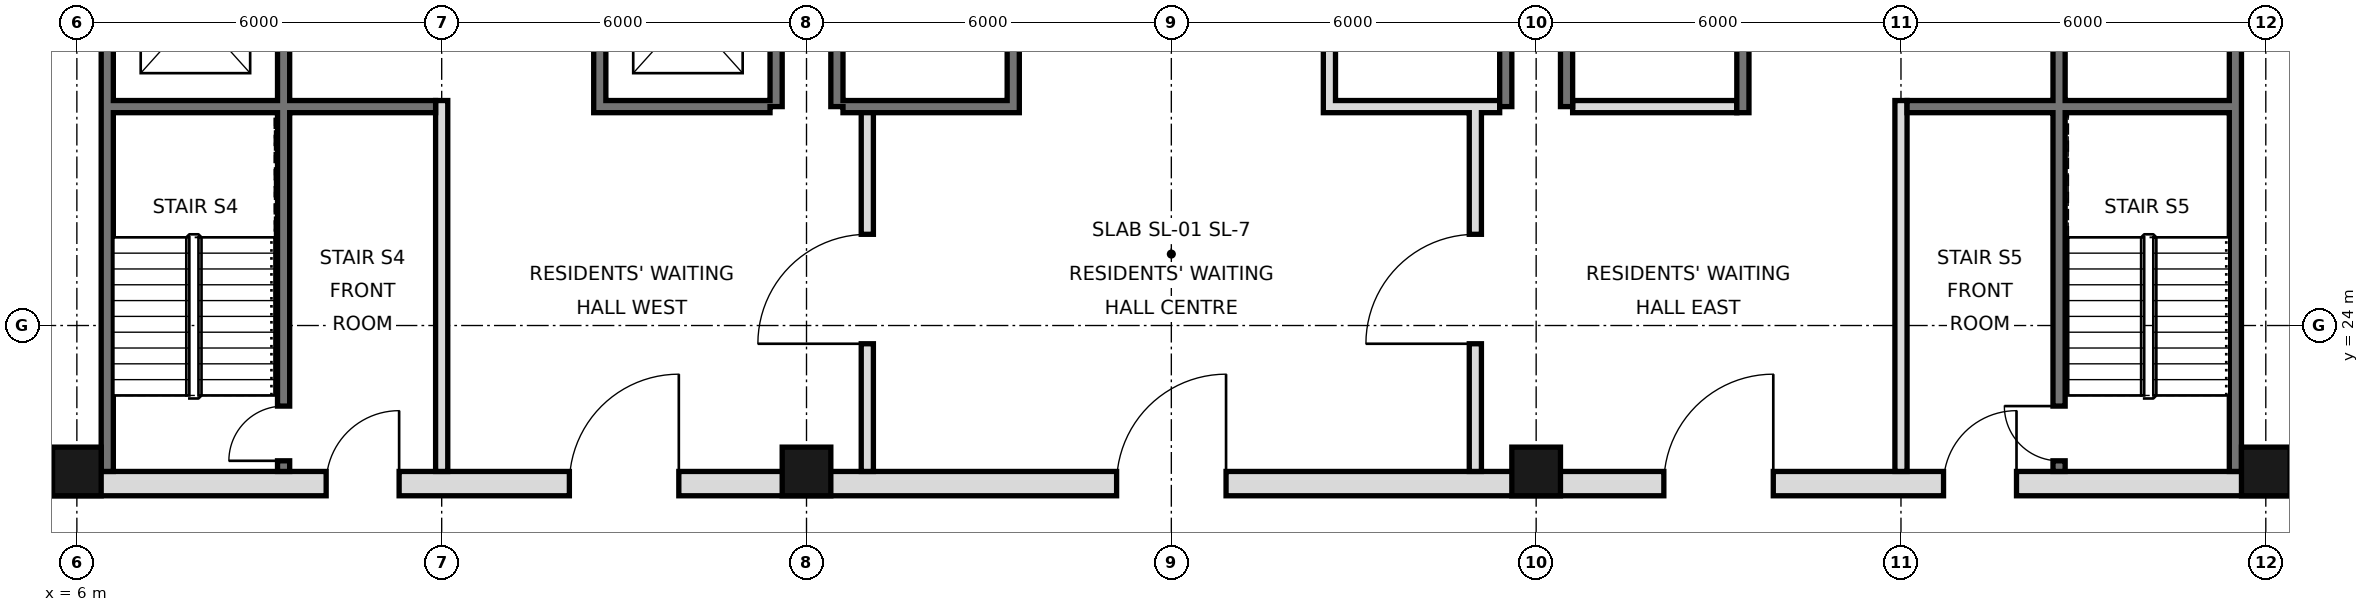
"""IFC4 building model, lengths in metres.
Left out: names, types, materials, properties, quantities, classifications, styles, units other than length and angle.
Written with IfcOpenShell. Run it as: python <this file> out.ifc"""

import sys

from ifc_helpers import new_model, si_unit, direction, frame, frame_2d, origin, origin_2d, place, context, subcontext, project, spatial, rectangle, hollow_rectangle, extrude, element, fill, save


model = new_model("IFC4")
c1 = context("Model", 3, precision=1e-05, world=origin(), true_north=direction((0.0, 1.0)))
c2 = subcontext(c1, "Body", "Model", "MODEL_VIEW")
j1 = project(units=[si_unit("LENGTHUNIT", "METRE"), si_unit("PLANEANGLEUNIT", "RADIAN")], contexts=[c1])
p1 = place(None, origin())
s1 = spatial("IfcSite", under=j1, at=p1, CompositionType="ELEMENT")
p2 = place(p1, origin())
s2 = spatial("IfcBuilding", under=s1, at=p2, CompositionType="ELEMENT")
p3 = place(p2, frame((0.0, 0.0, 123.2)))
s3 = spatial("IfcBuildingStorey", under=s2, at=p3, CompositionType="ELEMENT", Elevation=123.2)
for number, where, z_axis, x_axis in (
    (1, (6.0, 21.6, 0.0), (0.0, 0.0, 1.0), (1.0, 0.0, 0.0)),
    (2, (18.0, 21.6, 0.0), (0.0, 0.0, 1.0), (1.0, 0.0, 0.0)),
    (3, (30.0, 21.6, 0.0), (0.0, 0.0, 1.0), (1.0, 0.0, 0.0)),
    (4, (42.0, 21.6, 0.0), (0.0, 0.0, 1.0), (1.0, 0.0, 0.0)),
):
    element("IfcColumn", number, at=place(p3, frame(where, z_axis=z_axis, x_axis=x_axis)), inside=s3, PredefinedType="COLUMN", context=c2, shape_type="SweptSolid", body=[
        extrude(hollow_rectangle(XDim=0.8, YDim=0.8, WallThickness=0.05, at=origin_2d()), origin(), (0.0, 0.0, 1.0), 3.6),
    ])
for number, where, z_axis, x_axis in (
    (5, (6.5, 21.6, 0.0), (0.0, 0.0, 1.0), (0.0, 1.0, 0.0)),
    (6, (41.5, 21.6, 0.0), (0.0, 0.0, 1.0), (0.0, 1.0, 0.0)),
):
    element("IfcWall", number, at=place(p3, frame(where, z_axis=z_axis, x_axis=x_axis)), inside=s3, PredefinedType="SOLIDWALL", context=c2, shape_type="SweptSolid", body=[
        extrude(rectangle(XDim=23.5, YDim=0.2, at=frame_2d((11.75, 0.0))), origin(), (0.0, 0.0, 1.0), 3.42),
    ])
for number, where, z_axis, x_axis in (
    (7, (17.5, 27.6, 0.0), (0.0, 0.0, 1.0), (0.0, 1.0, 0.0)),
    (8, (18.5, 27.6, 0.0), (0.0, 0.0, 1.0), (0.0, 1.0, 0.0)),
    (9, (29.5, 27.6, 0.0), (0.0, 0.0, 1.0), (0.0, 1.0, 0.0)),
    (10, (30.5, 27.6, 0.0), (0.0, 0.0, 1.0), (0.0, 1.0, 0.0)),
):
    element("IfcWall", number, at=place(p3, frame(where, z_axis=z_axis, x_axis=x_axis)), inside=s3, PredefinedType="SOLIDWALL", context=c2, shape_type="SweptSolid", body=[
        extrude(rectangle(XDim=17.5, YDim=0.2, at=frame_2d((8.75, 0.0))), origin(), (0.0, 0.0, 1.0), 3.42),
    ])
p4 = place(p3, frame((5.6, 21.4, 0.0), z_axis=(0.0, 0.0, 1.0), x_axis=(1.0, 0.0, 0.0)))
e11 = element("IfcWall", 11, at=p4, inside=s3, PredefinedType="SOLIDWALL", context=c2, shape_type="SweptSolid", body=[
    extrude(rectangle(XDim=36.8, YDim=0.4, at=frame_2d((18.4, 0.0))), origin(), (0.0, 0.0, 1.0), 3.42),
])
p5 = place(p4, frame((8.5, 0.0, 0.0)))
e12 = element("IfcOpeningElement", 12, at=p5, cuts=e11, PredefinedType="OPENING", context=c2, shape_type="SweptSolid", body=[
    extrude(rectangle(XDim=1.8, YDim=2.1, at=frame_2d((0.9, 1.05))), frame((0.0, 0.21, 0.0), z_axis=(0.0, -1.0, 0.0), x_axis=(1.0, 0.0, 0.0)), (0.0, 0.0, 1.0), 0.42),
])
p6 = place(p4, frame((17.5, 0.0, 0.0)))
e13 = element("IfcOpeningElement", 13, at=p6, cuts=e11, PredefinedType="OPENING", context=c2, shape_type="SweptSolid", body=[
    extrude(rectangle(XDim=1.8, YDim=2.1, at=frame_2d((0.9, 1.05))), frame((0.0, 0.21, 0.0), z_axis=(0.0, -1.0, 0.0), x_axis=(1.0, 0.0, 0.0)), (0.0, 0.0, 1.0), 0.42),
])
p7 = place(p4, frame((26.5, 0.0, 0.0)))
e14 = element("IfcOpeningElement", 14, at=p7, cuts=e11, PredefinedType="OPENING", context=c2, shape_type="SweptSolid", body=[
    extrude(rectangle(XDim=1.8, YDim=2.1, at=frame_2d((0.9, 1.05))), frame((0.0, 0.21, 0.0), z_axis=(0.0, -1.0, 0.0), x_axis=(1.0, 0.0, 0.0)), (0.0, 0.0, 1.0), 0.42),
])
p8 = place(p4, frame((4.5, 0.0, 0.0)))
e15 = element("IfcOpeningElement", 15, at=p8, cuts=e11, PredefinedType="OPENING", context=c2, shape_type="SweptSolid", body=[
    extrude(rectangle(XDim=1.2, YDim=2.1, at=frame_2d((0.6, 1.05))), frame((0.0, 0.21, 0.0), z_axis=(0.0, -1.0, 0.0), x_axis=(1.0, 0.0, 0.0)), (0.0, 0.0, 1.0), 0.42),
])
p9 = place(p4, frame((31.1, 0.0, 0.0)))
e16 = element("IfcOpeningElement", 16, at=p9, cuts=e11, PredefinedType="OPENING", context=c2, shape_type="SweptSolid", body=[
    extrude(rectangle(XDim=1.2, YDim=2.1, at=frame_2d((0.6, 1.05))), frame((0.0, 0.21, 0.0), z_axis=(0.0, -1.0, 0.0), x_axis=(1.0, 0.0, 0.0)), (0.0, 0.0, 1.0), 0.42),
])
p10 = place(p3, frame((19.0, 21.6, 0.0), z_axis=(0.0, 0.0, 1.0), x_axis=(0.0, 1.0, 0.0)))
e17 = element("IfcWall", 17, at=p10, inside=s3, PredefinedType="PARTITIONING", context=c2, shape_type="SweptSolid", body=[
    extrude(rectangle(XDim=6.0, YDim=0.2, at=frame_2d((3.0, 0.0))), origin(), (0.0, 0.0, 1.0), 3.42),
])
p11 = place(p10, frame((2.1, 0.0, 0.0)))
e18 = element("IfcOpeningElement", 18, at=p11, cuts=e17, PredefinedType="OPENING", context=c2, shape_type="SweptSolid", body=[
    extrude(rectangle(XDim=1.8, YDim=2.1, at=frame_2d((0.9, 1.05))), frame((0.0, 0.11, 0.0), z_axis=(0.0, -1.0, 0.0), x_axis=(1.0, 0.0, 0.0)), (0.0, 0.0, 1.0), 0.22),
])
p12 = place(p3, frame((29.0, 21.6, 0.0), z_axis=(0.0, 0.0, 1.0), x_axis=(0.0, 1.0, 0.0)))
e19 = element("IfcWall", 19, at=p12, inside=s3, PredefinedType="PARTITIONING", context=c2, shape_type="SweptSolid", body=[
    extrude(rectangle(XDim=6.0, YDim=0.2, at=frame_2d((3.0, 0.0))), origin(), (0.0, 0.0, 1.0), 3.42),
])
p13 = place(p12, frame((2.1, 0.0, 0.0)))
e20 = element("IfcOpeningElement", 20, at=p13, cuts=e19, PredefinedType="OPENING", context=c2, shape_type="SweptSolid", body=[
    extrude(rectangle(XDim=1.8, YDim=2.1, at=frame_2d((0.9, 1.05))), frame((0.0, 0.11, 0.0), z_axis=(0.0, -1.0, 0.0), x_axis=(1.0, 0.0, 0.0)), (0.0, 0.0, 1.0), 0.22),
])
p14 = place(p3, frame((12.0, 21.6, 0.0), z_axis=(0.0, 0.0, 1.0), x_axis=(0.0, 1.0, 0.0)))
e21 = element("IfcWall", 21, at=p14, inside=s3, PredefinedType="PARTITIONING", context=c2, shape_type="SweptSolid", body=[
    extrude(rectangle(XDim=6.1, YDim=0.2, at=frame_2d((3.05, 0.0))), origin(), (0.0, 0.0, 1.0), 3.42),
])
p15 = place(p3, frame((14.6, 27.5, 0.0), z_axis=(0.0, 0.0, 1.0), x_axis=(0.0, 1.0, 0.0)))
e22 = element("IfcWall", 22, at=p15, inside=s3, PredefinedType="SOLIDWALL", context=c2, shape_type="SweptSolid", body=[
    extrude(rectangle(XDim=17.5, YDim=0.2, at=frame_2d((8.75, 0.0))), origin(), (0.0, 0.0, 1.0), 3.42),
])
p16 = place(p15, frame((1.1, 0.0, 0.0)))
e23 = element("IfcOpeningElement", 23, at=p16, cuts=e22, PredefinedType="OPENING", context=c2, shape_type="SweptSolid", body=[
    extrude(rectangle(XDim=1.1, YDim=2.1, at=frame_2d((0.55, 1.05))), frame((0.0, 0.11, 0.0), z_axis=(0.0, -1.0, 0.0), x_axis=(1.0, 0.0, 0.0)), (0.0, 0.0, 1.0), 0.22),
])
p17 = place(p15, frame((4.2, 0.0, 0.0)))
e24 = element("IfcOpeningElement", 24, at=p17, cuts=e22, PredefinedType="OPENING", context=c2, shape_type="SweptSolid", body=[
    extrude(rectangle(XDim=1.1, YDim=2.1, at=frame_2d((0.55, 1.05))), frame((0.0, 0.11, 0.0), z_axis=(0.0, -1.0, 0.0), x_axis=(1.0, 0.0, 0.0)), (0.0, 0.0, 1.0), 0.22),
])
p18 = place(p15, frame((15.4, 0.0, 0.0)))
e25 = element("IfcOpeningElement", 25, at=p18, cuts=e22, PredefinedType="OPENING", context=c2, shape_type="SweptSolid", body=[
    extrude(rectangle(XDim=1.1, YDim=2.1, at=frame_2d((0.55, 1.05))), frame((0.0, 0.11, 0.0), z_axis=(0.0, -1.0, 0.0), x_axis=(1.0, 0.0, 0.0)), (0.0, 0.0, 1.0), 0.22),
])
p19 = place(p15, frame((9.9, 0.0, 0.0)))
e26 = element("IfcOpeningElement", 26, at=p19, cuts=e22, PredefinedType="OPENING", context=c2, shape_type="SweptSolid", body=[
    extrude(rectangle(XDim=0.9, YDim=2.1, at=frame_2d((0.45, 1.05))), frame((0.0, 0.11, 0.0), z_axis=(0.0, -1.0, 0.0), x_axis=(1.0, 0.0, 0.0)), (0.0, 0.0, 1.0), 0.22),
])
p20 = place(p3, frame((21.4, 27.5, 0.0), z_axis=(0.0, 0.0, 1.0), x_axis=(0.0, 1.0, 0.0)))
e27 = element("IfcWall", 27, at=p20, inside=s3, PredefinedType="SOLIDWALL", context=c2, shape_type="SweptSolid", body=[
    extrude(rectangle(XDim=17.5, YDim=0.2, at=frame_2d((8.75, 0.0))), origin(), (0.0, 0.0, 1.0), 3.42),
])
p21 = place(p20, frame((16.2, 0.0, 0.0)))
e28 = element("IfcOpeningElement", 28, at=p21, cuts=e27, PredefinedType="OPENING", context=c2, shape_type="SweptSolid", body=[
    extrude(rectangle(XDim=1.0, YDim=2.1, at=frame_2d((0.5, 1.05))), frame((0.0, 0.11, 0.0), z_axis=(0.0, -1.0, 0.0), x_axis=(1.0, 0.0, 0.0)), (0.0, 0.0, 1.0), 0.22),
])
p22 = place(p20, frame((7.4, 0.0, 0.0)))
e29 = element("IfcOpeningElement", 29, at=p22, cuts=e27, PredefinedType="OPENING", context=c2, shape_type="SweptSolid", body=[
    extrude(rectangle(XDim=0.9, YDim=2.1, at=frame_2d((0.45, 1.05))), frame((0.0, 0.11, 0.0), z_axis=(0.0, -1.0, 0.0), x_axis=(1.0, 0.0, 0.0)), (0.0, 0.0, 1.0), 0.22),
])
p23 = place(p3, frame((26.6, 27.5, 0.0), z_axis=(0.0, 0.0, 1.0), x_axis=(0.0, 1.0, 0.0)))
e30 = element("IfcWall", 30, at=p23, inside=s3, PredefinedType="SOLIDWALL", context=c2, shape_type="SweptSolid", body=[
    extrude(rectangle(XDim=17.5, YDim=0.2, at=frame_2d((8.75, 0.0))), origin(), (0.0, 0.0, 1.0), 3.42),
])
p24 = place(p23, frame((4.3, 0.0, 0.0)))
e31 = element("IfcOpeningElement", 31, at=p24, cuts=e30, PredefinedType="OPENING", context=c2, shape_type="SweptSolid", body=[
    extrude(rectangle(XDim=0.9, YDim=2.1, at=frame_2d((0.45, 1.05))), frame((0.0, 0.11, 0.0), z_axis=(0.0, -1.0, 0.0), x_axis=(1.0, 0.0, 0.0)), (0.0, 0.0, 1.0), 0.22),
])
p25 = place(p23, frame((10.35, 0.0, 0.0)))
e32 = element("IfcOpeningElement", 32, at=p25, cuts=e30, PredefinedType="OPENING", context=c2, shape_type="SweptSolid", body=[
    extrude(rectangle(XDim=1.0, YDim=2.1, at=frame_2d((0.5, 1.05))), frame((0.0, 0.11, 0.0), z_axis=(0.0, -1.0, 0.0), x_axis=(1.0, 0.0, 0.0)), (0.0, 0.0, 1.0), 0.22),
])
p26 = place(p23, frame((15.475, 0.0, 0.0)))
e33 = element("IfcOpeningElement", 33, at=p26, cuts=e30, PredefinedType="OPENING", context=c2, shape_type="SweptSolid", body=[
    extrude(rectangle(XDim=1.0, YDim=2.1, at=frame_2d((0.5, 1.05))), frame((0.0, 0.11, 0.0), z_axis=(0.0, -1.0, 0.0), x_axis=(1.0, 0.0, 0.0)), (0.0, 0.0, 1.0), 0.22),
])
p27 = place(p3, frame((33.4, 27.5, 0.0), z_axis=(0.0, 0.0, 1.0), x_axis=(0.0, 1.0, 0.0)))
e34 = element("IfcWall", 34, at=p27, inside=s3, PredefinedType="SOLIDWALL", context=c2, shape_type="SweptSolid", body=[
    extrude(rectangle(XDim=17.5, YDim=0.2, at=frame_2d((8.75, 0.0))), origin(), (0.0, 0.0, 1.0), 3.42),
])
p28 = place(p27, frame((15.4, 0.0, 0.0)))
e35 = element("IfcOpeningElement", 35, at=p28, cuts=e34, PredefinedType="OPENING", context=c2, shape_type="SweptSolid", body=[
    extrude(rectangle(XDim=1.1, YDim=2.1, at=frame_2d((0.55, 1.05))), frame((0.0, 0.11, 0.0), z_axis=(0.0, -1.0, 0.0), x_axis=(1.0, 0.0, 0.0)), (0.0, 0.0, 1.0), 0.22),
])
p29 = place(p27, frame((2.7, 0.0, 0.0)))
e36 = element("IfcOpeningElement", 36, at=p29, cuts=e34, PredefinedType="OPENING", context=c2, shape_type="SweptSolid", body=[
    extrude(rectangle(XDim=1.0, YDim=2.1, at=frame_2d((0.5, 1.05))), frame((0.0, 0.11, 0.0), z_axis=(0.0, -1.0, 0.0), x_axis=(1.0, 0.0, 0.0)), (0.0, 0.0, 1.0), 0.22),
])
p30 = place(p27, frame((9.9, 0.0, 0.0)))
e37 = element("IfcOpeningElement", 37, at=p30, cuts=e34, PredefinedType="OPENING", context=c2, shape_type="SweptSolid", body=[
    extrude(rectangle(XDim=0.9, YDim=2.1, at=frame_2d((0.45, 1.05))), frame((0.0, 0.11, 0.0), z_axis=(0.0, -1.0, 0.0), x_axis=(1.0, 0.0, 0.0)), (0.0, 0.0, 1.0), 0.22),
])
p31 = place(p3, frame((36.0, 21.6, 0.0), z_axis=(0.0, 0.0, 1.0), x_axis=(0.0, 1.0, 0.0)))
e38 = element("IfcWall", 38, at=p31, inside=s3, PredefinedType="PARTITIONING", context=c2, shape_type="SweptSolid", body=[
    extrude(rectangle(XDim=6.1, YDim=0.2, at=frame_2d((3.05, 0.0))), origin(), (0.0, 0.0, 1.0), 3.42),
])
p32 = place(p3, frame((38.6, 21.6, 0.0), z_axis=(0.0, 0.0, 1.0), x_axis=(0.0, 1.0, 0.0)))
e39 = element("IfcWall", 39, at=p32, inside=s3, PredefinedType="SOLIDWALL", context=c2, shape_type="SweptSolid", body=[
    extrude(rectangle(XDim=23.4, YDim=0.2, at=frame_2d((11.7, 0.0))), origin(), (0.0, 0.0, 1.0), 3.42),
])
p33 = place(p32, frame((8.6, 0.0, 0.0)))
e40 = element("IfcOpeningElement", 40, at=p33, cuts=e39, PredefinedType="OPENING", context=c2, shape_type="SweptSolid", body=[
    extrude(rectangle(XDim=1.0, YDim=2.1, at=frame_2d((0.5, 1.05))), frame((0.0, 0.11, 0.0), z_axis=(0.0, -1.0, 0.0), x_axis=(1.0, 0.0, 0.0)), (0.0, 0.0, 1.0), 0.22),
])
p34 = place(p32, frame((13.25, 0.0, 0.0)))
e41 = element("IfcOpeningElement", 41, at=p34, cuts=e39, PredefinedType="OPENING", context=c2, shape_type="SweptSolid", body=[
    extrude(rectangle(XDim=1.0, YDim=2.1, at=frame_2d((0.5, 1.05))), frame((0.0, 0.11, 0.0), z_axis=(0.0, -1.0, 0.0), x_axis=(1.0, 0.0, 0.0)), (0.0, 0.0, 1.0), 0.22),
])
p35 = place(p32, frame((22.1, 0.0, 0.0)))
e42 = element("IfcOpeningElement", 42, at=p35, cuts=e39, PredefinedType="OPENING", context=c2, shape_type="SweptSolid", body=[
    extrude(rectangle(XDim=1.0, YDim=2.1, at=frame_2d((0.5, 1.05))), frame((0.0, 0.11, 0.0), z_axis=(0.0, -1.0, 0.0), x_axis=(1.0, 0.0, 0.0)), (0.0, 0.0, 1.0), 0.22),
])
p36 = place(p32, frame((0.175, 0.0, 0.0)))
e43 = element("IfcOpeningElement", 43, at=p36, cuts=e39, PredefinedType="OPENING", context=c2, shape_type="SweptSolid", body=[
    extrude(rectangle(XDim=0.9, YDim=2.1, at=frame_2d((0.45, 1.05))), frame((0.0, 0.11, 0.0), z_axis=(0.0, -1.0, 0.0), x_axis=(1.0, 0.0, 0.0)), (0.0, 0.0, 1.0), 0.22),
])
p37 = place(p3, frame((9.4, 21.6, 0.0), z_axis=(0.0, 0.0, 1.0), x_axis=(0.0, 1.0, 0.0)))
e44 = element("IfcWall", 44, at=p37, inside=s3, PredefinedType="SOLIDWALL", context=c2, shape_type="SweptSolid", body=[
    extrude(rectangle(XDim=23.4, YDim=0.2, at=frame_2d((11.7, 0.0))), origin(), (0.0, 0.0, 1.0), 3.42),
])
p38 = place(p37, frame((7.0, 0.0, 0.0)))
e45 = element("IfcOpeningElement", 45, at=p38, cuts=e44, PredefinedType="OPENING", context=c2, shape_type="SweptSolid", body=[
    extrude(rectangle(XDim=1.1, YDim=2.1, at=frame_2d((0.55, 1.05))), frame((0.0, 0.11, 0.0), z_axis=(0.0, -1.0, 0.0), x_axis=(1.0, 0.0, 0.0)), (0.0, 0.0, 1.0), 0.22),
])
p39 = place(p37, frame((10.1, 0.0, 0.0)))
e46 = element("IfcOpeningElement", 46, at=p39, cuts=e44, PredefinedType="OPENING", context=c2, shape_type="SweptSolid", body=[
    extrude(rectangle(XDim=1.1, YDim=2.1, at=frame_2d((0.55, 1.05))), frame((0.0, 0.11, 0.0), z_axis=(0.0, -1.0, 0.0), x_axis=(1.0, 0.0, 0.0)), (0.0, 0.0, 1.0), 0.22),
])
p40 = place(p37, frame((13.2, 0.0, 0.0)))
e47 = element("IfcOpeningElement", 47, at=p40, cuts=e44, PredefinedType="OPENING", context=c2, shape_type="SweptSolid", body=[
    extrude(rectangle(XDim=1.1, YDim=2.1, at=frame_2d((0.55, 1.05))), frame((0.0, 0.11, 0.0), z_axis=(0.0, -1.0, 0.0), x_axis=(1.0, 0.0, 0.0)), (0.0, 0.0, 1.0), 0.22),
])
p41 = place(p37, frame((22.1, 0.0, 0.0)))
e48 = element("IfcOpeningElement", 48, at=p41, cuts=e44, PredefinedType="OPENING", context=c2, shape_type="SweptSolid", body=[
    extrude(rectangle(XDim=1.0, YDim=2.1, at=frame_2d((0.5, 1.05))), frame((0.0, 0.11, 0.0), z_axis=(0.0, -1.0, 0.0), x_axis=(1.0, 0.0, 0.0)), (0.0, 0.0, 1.0), 0.22),
])
p42 = place(p37, frame((0.175, 0.0, 0.0)))
e49 = element("IfcOpeningElement", 49, at=p42, cuts=e44, PredefinedType="OPENING", context=c2, shape_type="SweptSolid", body=[
    extrude(rectangle(XDim=0.9, YDim=2.1, at=frame_2d((0.45, 1.05))), frame((0.0, 0.11, 0.0), z_axis=(0.0, -1.0, 0.0), x_axis=(1.0, 0.0, 0.0)), (0.0, 0.0, 1.0), 0.22),
])
for number, where, z_axis, x_axis in (
    (50, (14.7, 27.6, 0.0), (0.0, 0.0, 1.0), (1.0, 0.0, 0.0)),
    (51, (18.6, 27.6, 0.0), (0.0, 0.0, 1.0), (1.0, 0.0, 0.0)),
    (52, (26.7, 27.6, 0.0), (0.0, 0.0, 1.0), (1.0, 0.0, 0.0)),
):
    element("IfcWall", number, at=place(p3, frame(where, z_axis=z_axis, x_axis=x_axis)), inside=s3, PredefinedType="SOLIDWALL", context=c2, shape_type="SweptSolid", body=[
        extrude(rectangle(XDim=2.7, YDim=0.2, at=frame_2d((1.35, 0.0))), origin(), (0.0, 0.0, 1.0), 3.42),
    ])
p43 = place(p3, frame((30.6, 27.6, 0.0), z_axis=(0.0, 0.0, 1.0), x_axis=(1.0, 0.0, 0.0)))
e53 = element("IfcWall", 53, at=p43, inside=s3, PredefinedType="PARTITIONING", context=c2, shape_type="SweptSolid", body=[
    extrude(rectangle(XDim=2.7, YDim=0.2, at=frame_2d((1.35, 0.0))), origin(), (0.0, 0.0, 1.0), 3.42),
])
for number, where, z_axis, x_axis in (
    (54, (36.1, 27.6, 0.0), (0.0, 0.0, 1.0), (1.0, 0.0, 0.0)),
    (55, (6.6, 27.6, 0.0), (0.0, 0.0, 1.0), (1.0, 0.0, 0.0)),
):
    element("IfcWall", number, at=place(p3, frame(where, z_axis=z_axis, x_axis=x_axis)), inside=s3, PredefinedType="SOLIDWALL", context=c2, shape_type="SweptSolid", body=[
        extrude(rectangle(XDim=5.3, YDim=0.2, at=frame_2d((2.65, 0.0))), origin(), (0.0, 0.0, 1.0), 3.42),
    ])
p44 = place(p5, frame((1.8, 0.0, 0.0), z_axis=(0.0, 0.0, 1.0), x_axis=(-1.0, 0.0, 0.0)))
e56 = element("IfcDoor", 56, at=p44, inside=s3, OperationType="SINGLE_SWING_LEFT", PredefinedType="DOOR", context=c2, shape_type="SweptSolid", body=[
    extrude(rectangle(XDim=1.8, YDim=2.1, at=frame_2d((0.9, 1.05))), frame((0.0, 0.025, 0.0), z_axis=(0.0, -1.0, 0.0), x_axis=(1.0, 0.0, 0.0)), (0.0, 0.0, 1.0), 0.05),
])
fill(e12, e56)
p45 = place(p11, origin())
e57 = element("IfcDoor", 57, at=p45, inside=s3, OperationType="SINGLE_SWING_LEFT", PredefinedType="DOOR", context=c2, shape_type="SweptSolid", body=[
    extrude(rectangle(XDim=1.8, YDim=2.1, at=frame_2d((0.9, 1.05))), frame((0.0, 0.025, 0.0), z_axis=(0.0, -1.0, 0.0), x_axis=(1.0, 0.0, 0.0)), (0.0, 0.0, 1.0), 0.05),
])
fill(e18, e57)
p46 = place(p6, frame((1.8, 0.0, 0.0), z_axis=(0.0, 0.0, 1.0), x_axis=(-1.0, 0.0, 0.0)))
e58 = element("IfcDoor", 58, at=p46, inside=s3, OperationType="SINGLE_SWING_LEFT", PredefinedType="DOOR", context=c2, shape_type="SweptSolid", body=[
    extrude(rectangle(XDim=1.8, YDim=2.1, at=frame_2d((0.9, 1.05))), frame((0.0, 0.025, 0.0), z_axis=(0.0, -1.0, 0.0), x_axis=(1.0, 0.0, 0.0)), (0.0, 0.0, 1.0), 0.05),
])
fill(e13, e58)
p47 = place(p13, origin())
e59 = element("IfcDoor", 59, at=p47, inside=s3, OperationType="SINGLE_SWING_LEFT", PredefinedType="DOOR", context=c2, shape_type="SweptSolid", body=[
    extrude(rectangle(XDim=1.8, YDim=2.1, at=frame_2d((0.9, 1.05))), frame((0.0, 0.025, 0.0), z_axis=(0.0, -1.0, 0.0), x_axis=(1.0, 0.0, 0.0)), (0.0, 0.0, 1.0), 0.05),
])
fill(e20, e59)
p48 = place(p7, frame((1.8, 0.0, 0.0), z_axis=(0.0, 0.0, 1.0), x_axis=(-1.0, 0.0, 0.0)))
e60 = element("IfcDoor", 60, at=p48, inside=s3, OperationType="SINGLE_SWING_LEFT", PredefinedType="DOOR", context=c2, shape_type="SweptSolid", body=[
    extrude(rectangle(XDim=1.8, YDim=2.1, at=frame_2d((0.9, 1.05))), frame((0.0, 0.025, 0.0), z_axis=(0.0, -1.0, 0.0), x_axis=(1.0, 0.0, 0.0)), (0.0, 0.0, 1.0), 0.05),
])
fill(e14, e60)
p49 = place(p8, frame((1.2, 0.0, 0.0), z_axis=(0.0, 0.0, 1.0), x_axis=(-1.0, 0.0, 0.0)))
e61 = element("IfcDoor", 61, at=p49, inside=s3, OperationType="SINGLE_SWING_LEFT", PredefinedType="DOOR", context=c2, shape_type="SweptSolid", body=[
    extrude(rectangle(XDim=1.2, YDim=2.1, at=frame_2d((0.6, 1.05))), frame((0.0, 0.025, 0.0), z_axis=(0.0, -1.0, 0.0), x_axis=(1.0, 0.0, 0.0)), (0.0, 0.0, 1.0), 0.05),
])
fill(e15, e61)
p50 = place(p9, frame((1.2, 0.0, 0.0), z_axis=(0.0, 0.0, 1.0), x_axis=(-1.0, 0.0, 0.0)))
e62 = element("IfcDoor", 62, at=p50, inside=s3, OperationType="SINGLE_SWING_LEFT", PredefinedType="DOOR", context=c2, shape_type="SweptSolid", body=[
    extrude(rectangle(XDim=1.2, YDim=2.1, at=frame_2d((0.6, 1.05))), frame((0.0, 0.025, 0.0), z_axis=(0.0, -1.0, 0.0), x_axis=(1.0, 0.0, 0.0)), (0.0, 0.0, 1.0), 0.05),
])
fill(e16, e62)
p51 = place(p42, origin())
e63 = element("IfcDoor", 63, at=p51, inside=s3, OperationType="SINGLE_SWING_LEFT", PredefinedType="DOOR", context=c2, shape_type="SweptSolid", body=[
    extrude(rectangle(XDim=0.9, YDim=2.1, at=frame_2d((0.45, 1.05))), frame((0.0, 0.025, 0.0), z_axis=(0.0, -1.0, 0.0), x_axis=(1.0, 0.0, 0.0)), (0.0, 0.0, 1.0), 0.05),
])
fill(e49, e63)
p52 = place(p36, frame((0.9, 0.0, 0.0), z_axis=(0.0, 0.0, 1.0), x_axis=(-1.0, 0.0, 0.0)))
e64 = element("IfcDoor", 64, at=p52, inside=s3, OperationType="SINGLE_SWING_LEFT", PredefinedType="DOOR", context=c2, shape_type="SweptSolid", body=[
    extrude(rectangle(XDim=0.9, YDim=2.1, at=frame_2d((0.45, 1.05))), frame((0.0, 0.025, 0.0), z_axis=(0.0, -1.0, 0.0), x_axis=(1.0, 0.0, 0.0)), (0.0, 0.0, 1.0), 0.05),
])
fill(e43, e64)
save(model, sys.argv[1])
